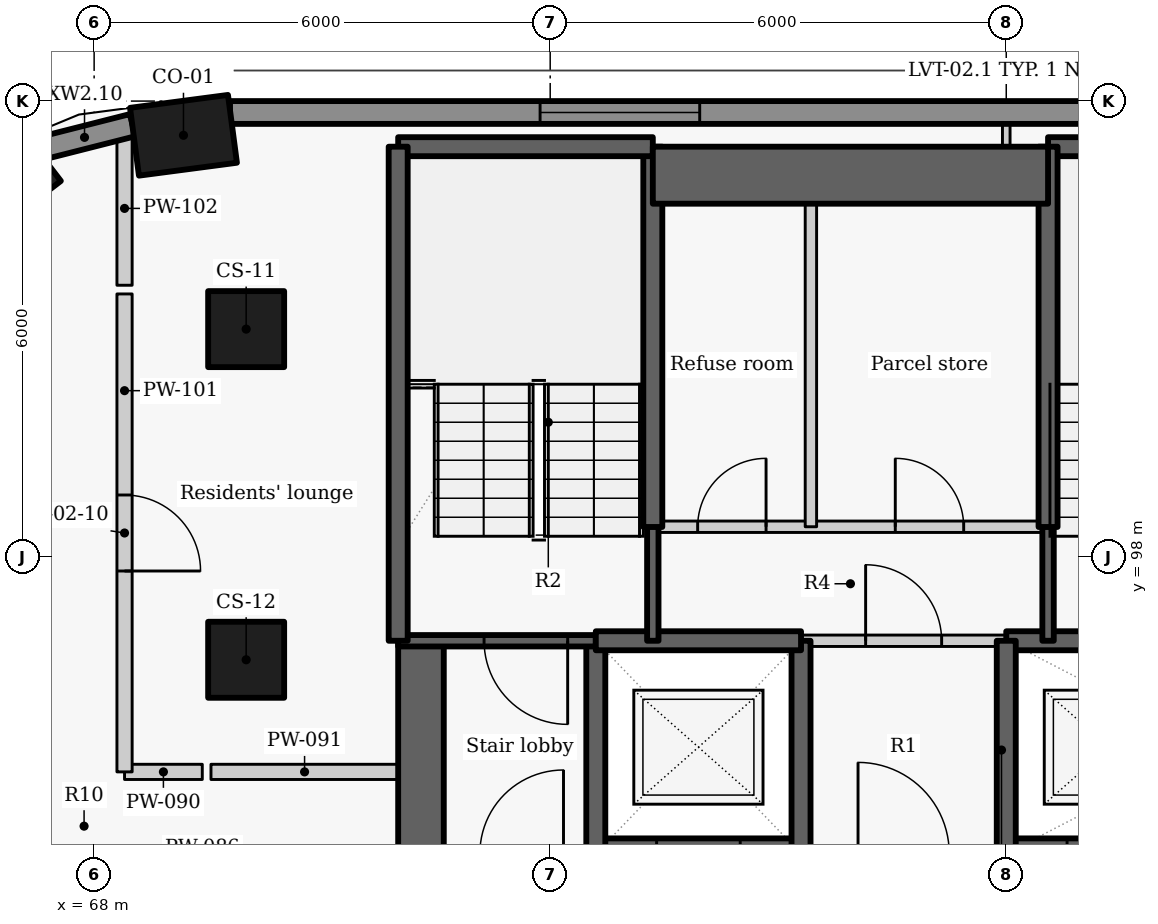
"""IFC4 building model, lengths in metres.
Left out: names, types, materials, properties, quantities, classifications, styles, units other than length and angle.
Written with IfcOpenShell. Run it as: python <this file> out.ifc"""

import sys

from ifc_helpers import new_model, si_unit, direction, frame, frame_2d, origin, origin_2d, place, context, subcontext, project, spatial, rectangle, extrude, element, fill, save


model = new_model("IFC4")
c1 = context("Model", 3, precision=1e-05, world=origin(), true_north=direction((0.0, 1.0)))
c2 = subcontext(c1, "Body", "Model", "MODEL_VIEW")
j1 = project(units=[si_unit("LENGTHUNIT", "METRE"), si_unit("PLANEANGLEUNIT", "RADIAN")], contexts=[c1])
p1 = place(None, origin())
s1 = spatial("IfcSite", under=j1, at=p1, CompositionType="ELEMENT")
p2 = place(p1, origin())
s2 = spatial("IfcBuilding", under=s1, at=p2, CompositionType="ELEMENT")
p3 = place(p2, frame((0.0, 0.0, 130.5)))
s3 = spatial("IfcBuildingStorey", under=s2, at=p3, CompositionType="ELEMENT", Elevation=130.5)
for number, where, z_axis, x_axis in (
    (1, (69.175, 103.55, 0.0), (0.0, 0.0, 1.0), (-0.991, -0.131, 0.0)),
    (2, (66.773, 102.91, 0.0), (0.0, 0.0, 1.0), (-0.793, -0.609, 0.0)),
):
    element("IfcColumn", number, at=place(p3, frame(where, z_axis=z_axis, x_axis=x_axis)), inside=s3, PredefinedType="COLUMN", context=c2, shape_type="SweptSolid", body=[
        extrude(rectangle(XDim=1.3, YDim=0.9, at=origin_2d()), origin(), (0.0, 0.0, 1.0), 3.3),
    ])
for number, where, z_axis, x_axis in (
    (3, (70.0, 101.0, 0.0), (0.0, 0.0, 1.0), (0.0, -1.0, 0.0)),
    (4, (70.0, 96.65, 0.0), (0.0, 0.0, 1.0), (0.0, -1.0, 0.0)),
):
    element("IfcColumn", number, at=place(p3, frame(where, z_axis=z_axis, x_axis=x_axis)), inside=s3, PredefinedType="COLUMN", context=c2, shape_type="SweptSolid", body=[
        extrude(rectangle(XDim=1.0, YDim=1.0, at=origin_2d()), origin(), (0.0, 0.0, 1.0), 3.3),
    ])
p4 = place(p3, frame((90.179, 103.85, 0.0), z_axis=(0.0, 0.0, 1.0), x_axis=(-1.0, 0.0, 0.0)))
e5 = element("IfcWall", 5, at=p4, inside=s3, PredefinedType="SOLIDWALL", context=c2, shape_type="SweptSolid", body=[
    extrude(rectangle(XDim=20.391, YDim=0.3, at=frame_2d((10.196, 0.0))), origin(), (0.0, 0.0, 1.0), 2.425),
])
p5 = place(p4, frame((4.051, 0.0, 0.9)))
e6 = element("IfcOpeningElement", 6, at=p5, cuts=e5, PredefinedType="OPENING", context=c2, shape_type="SweptSolid", body=[
    extrude(rectangle(XDim=2.1, YDim=1.1, at=frame_2d((1.05, 0.55))), frame((0.0, 0.16, 0.0), z_axis=(0.0, -1.0, 0.0), x_axis=(1.0, 0.0, 0.0)), (0.0, 0.0, 1.0), 0.32),
])
p6 = place(p4, frame((14.212, 0.0, 0.9)))
e7 = element("IfcOpeningElement", 7, at=p6, cuts=e5, PredefinedType="OPENING", context=c2, shape_type="SweptSolid", body=[
    extrude(rectangle(XDim=2.1, YDim=1.1, at=frame_2d((1.05, 0.55))), frame((0.0, 0.16, 0.0), z_axis=(0.0, -1.0, 0.0), x_axis=(1.0, 0.0, 0.0)), (0.0, 0.0, 1.0), 0.32),
])
p7 = place(p3, frame((68.506, 103.683, 0.0), z_axis=(0.0, 0.0, 1.0), x_axis=(-0.96924493129, -0.246098076322, 0.0)))
e8 = element("IfcWall", 8, at=p7, inside=s3, PredefinedType="SOLIDWALL", context=c2, shape_type="SweptSolid", body=[
    extrude(rectangle(XDim=1.305, YDim=0.3, at=frame_2d((0.653, 0.0))), origin(), (0.0, 0.0, 1.0), 2.425),
])
p8 = place(p3, frame((72.3, 87.8, -0.275), z_axis=(0.0, 0.0, 1.0), x_axis=(0.0, 1.0, 0.0)))
e9 = element("IfcWall", 9, at=p8, inside=s3, PredefinedType="SHEAR", context=c2, shape_type="SweptSolid", body=[
    extrude(rectangle(XDim=9.1, YDim=0.6, at=frame_2d((4.55, 0.0))), origin(), (0.0, 0.0, 1.0), 3.3),
])
p9 = place(p8, frame((3.852, 0.0, 0.275)))
e10 = element("IfcOpeningElement", 10, at=p9, cuts=e9, PredefinedType="OPENING", context=c2, shape_type="SweptSolid", body=[
    extrude(rectangle(XDim=1.5, YDim=2.1, at=frame_2d((0.75, 1.05))), frame((0.0, 0.31, 0.0), z_axis=(0.0, -1.0, 0.0), x_axis=(1.0, 0.0, 0.0)), (0.0, 0.0, 1.0), 0.62),
])
p10 = place(p3, frame((74.597, 94.1, -0.275), z_axis=(0.0, 0.0, 1.0), x_axis=(1.0, 0.0, 0.0)))
e11 = element("IfcWall", 11, at=p10, inside=s3, PredefinedType="SHEAR", context=c2, shape_type="SweptSolid", body=[
    extrude(rectangle(XDim=2.706, YDim=0.4, at=frame_2d((1.353, 0.0))), origin(), (0.0, 0.0, 1.0), 3.3),
])
p11 = place(p10, frame((0.803, 0.0, 0.275)))
e12 = element("IfcOpeningElement", 12, at=p11, cuts=e11, PredefinedType="OPENING", context=c2, shape_type="SweptSolid", body=[
    extrude(rectangle(XDim=1.1, YDim=2.1, at=frame_2d((0.55, 1.05))), frame((0.0, 0.21, 0.0), z_axis=(0.0, -1.0, 0.0), x_axis=(1.0, 0.0, 0.0)), (0.0, 0.0, 1.0), 0.42),
])
p12 = place(p3, frame((79.997, 94.1, -0.275), z_axis=(0.0, 0.0, 1.0), x_axis=(1.0, 0.0, 0.0)))
e13 = element("IfcWall", 13, at=p12, inside=s3, PredefinedType="SHEAR", context=c2, shape_type="SweptSolid", body=[
    extrude(rectangle(XDim=5.406, YDim=0.4, at=frame_2d((2.703, 0.0))), origin(), (0.0, 0.0, 1.0), 3.3),
])
p13 = place(p12, frame((0.803, 0.0, 0.275)))
e14 = element("IfcOpeningElement", 14, at=p13, cuts=e13, PredefinedType="OPENING", context=c2, shape_type="SweptSolid", body=[
    extrude(rectangle(XDim=1.1, YDim=2.1, at=frame_2d((0.55, 1.05))), frame((0.0, 0.21, 0.0), z_axis=(0.0, -1.0, 0.0), x_axis=(1.0, 0.0, 0.0)), (0.0, 0.0, 1.0), 0.42),
])
p14 = place(p3, frame((74.6, 94.1, -0.275), z_axis=(0.0, 0.0, 1.0), x_axis=(0.0, 1.0, 0.0)))
e15 = element("IfcWall", 15, at=p14, inside=s3, PredefinedType="SHEAR", context=c2, shape_type="SweptSolid", body=[
    extrude(rectangle(XDim=2.8, YDim=0.25, at=frame_2d((1.4, 0.0))), origin(), (0.0, 0.0, 1.0), 3.3),
])
p15 = place(p3, frame((74.6, 96.9, -0.275), z_axis=(0.0, 0.0, 1.0), x_axis=(-1.0, 0.0, 0.0)))
e16 = element("IfcWall", 16, at=p15, inside=s3, PredefinedType="SHEAR", context=c2, shape_type="SweptSolid", body=[
    extrude(rectangle(XDim=2.6, YDim=0.15, at=frame_2d((1.3, 0.0))), origin(), (0.0, 0.0, 1.0), 3.3),
])
p16 = place(p15, frame((0.37, 0.0, 0.275)))
e17 = element("IfcOpeningElement", 17, at=p16, cuts=e16, PredefinedType="OPENING", context=c2, shape_type="SweptSolid", body=[
    extrude(rectangle(XDim=1.1, YDim=2.1, at=frame_2d((0.55, 1.05))), frame((0.0, 0.085, 0.0), z_axis=(0.0, -1.0, 0.0), x_axis=(1.0, 0.0, 0.0)), (0.0, 0.0, 1.0), 0.17),
])
p17 = place(p3, frame((77.3, 94.1, -0.275), z_axis=(0.0, 0.0, 1.0), x_axis=(0.0, 1.0, 0.0)))
e18 = element("IfcWall", 18, at=p17, inside=s3, PredefinedType="SHEAR", context=c2, shape_type="SweptSolid", body=[
    extrude(rectangle(XDim=2.8, YDim=0.25, at=frame_2d((1.4, 0.0))), origin(), (0.0, 0.0, 1.0), 3.3),
])
p18 = place(p3, frame((74.6, 96.9, -0.275), z_axis=(0.0, 0.0, 1.0), x_axis=(1.0, 0.0, 0.0)))
e19 = element("IfcWall", 19, at=p18, inside=s3, PredefinedType="SHEAR", context=c2, shape_type="SweptSolid", body=[
    extrude(rectangle(XDim=2.7, YDim=0.25, at=frame_2d((1.35, 0.0))), origin(), (0.0, 0.0, 1.0), 3.3),
])
p19 = place(p3, frame((80.0, 96.9, -0.275), z_axis=(0.0, 0.0, 1.0), x_axis=(1.0, 0.0, 0.0)))
e20 = element("IfcWall", 20, at=p19, inside=s3, PredefinedType="SHEAR", context=c2, shape_type="SweptSolid", body=[
    extrude(rectangle(XDim=8.0, YDim=0.25, at=frame_2d((4.0, 0.0))), origin(), (0.0, 0.0, 1.0), 3.3),
])
p20 = place(p19, frame((3.849, 0.0, 0.275)))
e21 = element("IfcOpeningElement", 21, at=p20, cuts=e20, PredefinedType="OPENING", context=c2, shape_type="SweptSolid", body=[
    extrude(rectangle(XDim=1.1, YDim=2.1, at=frame_2d((0.55, 1.05))), frame((0.0, 0.135, 0.0), z_axis=(0.0, -1.0, 0.0), x_axis=(1.0, 0.0, 0.0)), (0.0, 0.0, 1.0), 0.27),
])
p21 = place(p3, frame((80.0, 94.1, -0.275), z_axis=(0.0, 0.0, 1.0), x_axis=(0.0, 1.0, 0.0)))
e22 = element("IfcWall", 22, at=p21, inside=s3, PredefinedType="SHEAR", context=c2, shape_type="SweptSolid", body=[
    extrude(rectangle(XDim=2.8, YDim=0.25, at=frame_2d((1.4, 0.0))), origin(), (0.0, 0.0, 1.0), 3.3),
])
p22 = place(p3, frame((77.3, 96.9, 0.0), z_axis=(0.0, 0.0, 1.0), x_axis=(1.0, 0.0, 0.0)))
e23 = element("IfcWall", 23, at=p22, inside=s3, PredefinedType="PARTITIONING", context=c2, shape_type="SweptSolid", body=[
    extrude(rectangle(XDim=2.7, YDim=0.15, at=frame_2d((1.35, 0.0))), origin(), (0.0, 0.0, 1.0), 3.025),
])
p23 = place(p22, frame((0.85, 0.0, 0.0)))
e24 = element("IfcOpeningElement", 24, at=p23, cuts=e23, PredefinedType="OPENING", context=c2, shape_type="SweptSolid", body=[
    extrude(rectangle(XDim=1.0, YDim=2.1, at=frame_2d((0.5, 1.05))), frame((0.0, 0.085, 0.0), z_axis=(0.0, -1.0, 0.0), x_axis=(1.0, 0.0, 0.0)), (0.0, 0.0, 1.0), 0.17),
])
p24 = place(p3, frame((75.35, 96.9, -0.275), z_axis=(0.0, 0.0, 1.0), x_axis=(0.0, 1.0, 0.0)))
e25 = element("IfcWall", 25, at=p24, inside=s3, PredefinedType="SHEAR", context=c2, shape_type="SweptSolid", body=[
    extrude(rectangle(XDim=1.503, YDim=0.15, at=frame_2d((0.751, 0.0))), origin(), (0.0, 0.0, 1.0), 3.3),
])
p25 = place(p3, frame((75.35, 98.397, -0.275), z_axis=(0.0, 0.0, 1.0), x_axis=(0.0, 1.0, 0.0)))
e26 = element("IfcWall", 26, at=p25, inside=s3, PredefinedType="SHEAR", context=c2, shape_type="SweptSolid", body=[
    extrude(rectangle(XDim=5.003, YDim=0.25, at=frame_2d((2.501, 0.0))), origin(), (0.0, 0.0, 1.0), 3.3),
])
p26 = place(p3, frame((72.0, 103.4, -0.275), z_axis=(0.0, 0.0, 1.0), x_axis=(1.0, 0.0, 0.0)))
e27 = element("IfcWall", 27, at=p26, inside=s3, PredefinedType="SHEAR", context=c2, shape_type="SweptSolid", body=[
    extrude(rectangle(XDim=3.35, YDim=0.25, at=frame_2d((1.675, 0.0))), origin(), (0.0, 0.0, 1.0), 3.3),
])
p27 = place(p3, frame((80.55, 103.4, -0.275), z_axis=(0.0, 0.0, 1.0), x_axis=(1.0, 0.0, 0.0)))
e28 = element("IfcWall", 28, at=p27, inside=s3, PredefinedType="SHEAR", context=c2, shape_type="SweptSolid", body=[
    extrude(rectangle(XDim=2.85, YDim=0.25, at=frame_2d((1.425, 0.0))), origin(), (0.0, 0.0, 1.0), 3.3),
])
p28 = place(p3, frame((72.0, 96.9, -0.275), z_axis=(0.0, 0.0, 1.0), x_axis=(0.0, 1.0, 0.0)))
e29 = element("IfcWall", 29, at=p28, inside=s3, PredefinedType="SHEAR", context=c2, shape_type="SweptSolid", body=[
    extrude(rectangle(XDim=6.5, YDim=0.25, at=frame_2d((3.25, 0.0))), origin(), (0.0, 0.0, 1.0), 3.3),
])
p29 = place(p3, frame((80.55, 96.9, -0.275), z_axis=(0.0, 0.0, 1.0), x_axis=(0.0, 1.0, 0.0)))
e30 = element("IfcWall", 30, at=p29, inside=s3, PredefinedType="SHEAR", context=c2, shape_type="SweptSolid", body=[
    extrude(rectangle(XDim=1.503, YDim=0.15, at=frame_2d((0.751, 0.0))), origin(), (0.0, 0.0, 1.0), 3.3),
])
p30 = place(p3, frame((80.55, 98.397, -0.275), z_axis=(0.0, 0.0, 1.0), x_axis=(0.0, 1.0, 0.0)))
e31 = element("IfcWall", 31, at=p30, inside=s3, PredefinedType="SHEAR", context=c2, shape_type="SweptSolid", body=[
    extrude(rectangle(XDim=5.003, YDim=0.25, at=frame_2d((2.501, 0.0))), origin(), (0.0, 0.0, 1.0), 3.3),
])
p31 = place(p3, frame((75.35, 103.025, -0.275), z_axis=(0.0, 0.0, 1.0), x_axis=(1.0, 0.0, 0.0)))
e32 = element("IfcWall", 32, at=p31, inside=s3, PredefinedType="SHEAR", context=c2, shape_type="SweptSolid", body=[
    extrude(rectangle(XDim=5.2, YDim=0.75, at=frame_2d((2.6, 0.0))), origin(), (0.0, 0.0, 1.0), 3.3),
])
p32 = place(p3, frame((75.35, 98.4, 0.0), z_axis=(0.0, 0.0, 1.0), x_axis=(1.0, 0.0, 0.0)))
e33 = element("IfcWall", 33, at=p32, inside=s3, PredefinedType="PARTITIONING", context=c2, shape_type="SweptSolid", body=[
    extrude(rectangle(XDim=5.2, YDim=0.15, at=frame_2d((2.6, 0.0))), origin(), (0.0, 0.0, 1.0), 3.025),
])
p33 = place(p32, frame((0.59, 0.0, 0.0)))
e34 = element("IfcOpeningElement", 34, at=p33, cuts=e33, PredefinedType="OPENING", context=c2, shape_type="SweptSolid", body=[
    extrude(rectangle(XDim=0.9, YDim=2.1, at=frame_2d((0.45, 1.05))), frame((0.0, 0.085, 0.0), z_axis=(0.0, -1.0, 0.0), x_axis=(1.0, 0.0, 0.0)), (0.0, 0.0, 1.0), 0.17),
])
p34 = place(p32, frame((3.19, 0.0, 0.0)))
e35 = element("IfcOpeningElement", 35, at=p34, cuts=e33, PredefinedType="OPENING", context=c2, shape_type="SweptSolid", body=[
    extrude(rectangle(XDim=0.9, YDim=2.1, at=frame_2d((0.45, 1.05))), frame((0.0, 0.085, 0.0), z_axis=(0.0, -1.0, 0.0), x_axis=(1.0, 0.0, 0.0)), (0.0, 0.0, 1.0), 0.17),
])
p35 = place(p3, frame((77.43, 98.4, 0.0), z_axis=(0.0, 0.0, 1.0), x_axis=(0.0, 1.0, 0.0)))
e36 = element("IfcWall", 36, at=p35, inside=s3, PredefinedType="PARTITIONING", context=c2, shape_type="SweptSolid", body=[
    extrude(rectangle(XDim=5.0, YDim=0.15, at=frame_2d((2.5, 0.0))), origin(), (0.0, 0.0, 1.0), 3.025),
])
p36 = place(p3, frame((68.4, 95.175, 0.0), z_axis=(0.0, 0.0, 1.0), x_axis=(1.0, 0.0, 0.0)))
e37 = element("IfcWall", 37, at=p36, inside=s3, PredefinedType="PARTITIONING", context=c2, shape_type="SweptSolid", body=[
    extrude(rectangle(XDim=1.023, YDim=0.2, at=frame_2d((0.511, 0.0))), origin(), (0.0, 0.0, 1.0), 3.025),
])
p37 = place(p3, frame((69.537, 95.175, 0.0), z_axis=(0.0, 0.0, 1.0), x_axis=(1.0, 0.0, 0.0)))
e38 = element("IfcWall", 38, at=p37, inside=s3, PredefinedType="PARTITIONING", context=c2, shape_type="SweptSolid", body=[
    extrude(rectangle(XDim=2.463, YDim=0.2, at=frame_2d((1.231, 0.0))), origin(), (0.0, 0.0, 1.0), 2.505),
])
p38 = place(p3, frame((68.4, 101.463, 0.0), z_axis=(0.0, 0.0, 1.0), x_axis=(0.0, -1.0, 0.0)))
e39 = element("IfcWall", 39, at=p38, inside=s3, PredefinedType="PARTITIONING", context=c2, shape_type="SweptSolid", body=[
    extrude(rectangle(XDim=6.288, YDim=0.2, at=frame_2d((3.144, 0.0))), origin(), (0.0, 0.0, 1.0), 3.025),
])
p39 = place(p38, frame((2.645, 0.0, 0.0)))
e40 = element("IfcOpeningElement", 40, at=p39, cuts=e39, PredefinedType="OPENING", context=c2, shape_type="SweptSolid", body=[
    extrude(rectangle(XDim=1.0, YDim=2.1, at=frame_2d((0.5, 1.05))), frame((0.0, 0.11, 0.0), z_axis=(0.0, -1.0, 0.0), x_axis=(1.0, 0.0, 0.0)), (0.0, 0.0, 1.0), 0.22),
])
p40 = place(p3, frame((68.4, 101.577, 0.0), z_axis=(0.0, 0.0, 1.0), x_axis=(0.0, 1.0, 0.0)))
e41 = element("IfcWall", 41, at=p40, inside=s3, PredefinedType="PARTITIONING", context=c2, shape_type="SweptSolid", body=[
    extrude(rectangle(XDim=2.022, YDim=0.2, at=frame_2d((1.011, 0.0))), origin(), (0.0, 0.0, 1.0), 2.405),
])
p41 = place(p3, frame((80.0, 103.4, 0.0), z_axis=(0.0, 0.0, 1.0), x_axis=(0.0, 1.0, 0.0)))
e42 = element("IfcWall", 42, at=p41, inside=s3, PredefinedType="PARTITIONING", context=c2, shape_type="SweptSolid", body=[
    extrude(rectangle(XDim=0.3, YDim=0.1, at=frame_2d((0.15, 0.0))), origin(), (0.0, 0.0, 1.0), 3.025),
])
p42 = place(p6, origin())
e43 = element("IfcWindow", 43, at=p42, inside=s3, PartitioningType="SINGLE_PANEL", PredefinedType="WINDOW", context=c2, shape_type="SweptSolid", body=[
    extrude(rectangle(XDim=2.1, YDim=1.1, at=frame_2d((1.05, 0.55))), frame((0.0, 0.03, 0.0), z_axis=(0.0, -1.0, 0.0), x_axis=(1.0, 0.0, 0.0)), (0.0, 0.0, 1.0), 0.06),
])
fill(e7, e43)
p43 = place(p23, origin())
e44 = element("IfcDoor", 44, at=p43, inside=s3, OperationType="SINGLE_SWING_LEFT", PredefinedType="DOOR", context=c2, shape_type="SweptSolid", body=[
    extrude(rectangle(XDim=1.0, YDim=2.1, at=frame_2d((0.5, 1.05))), frame((0.0, 0.025, 0.0), z_axis=(0.0, -1.0, 0.0), x_axis=(1.0, 0.0, 0.0)), (0.0, 0.0, 1.0), 0.05),
])
fill(e24, e44)
p44 = place(p33, origin())
e45 = element("IfcDoor", 45, at=p44, inside=s3, OperationType="SINGLE_SWING_RIGHT", PredefinedType="DOOR", context=c2, shape_type="SweptSolid", body=[
    extrude(rectangle(XDim=0.9, YDim=2.1, at=frame_2d((0.45, 1.05))), frame((0.0, 0.025, 0.0), z_axis=(0.0, -1.0, 0.0), x_axis=(1.0, 0.0, 0.0)), (0.0, 0.0, 1.0), 0.05),
])
fill(e34, e45)
p45 = place(p34, origin())
e46 = element("IfcDoor", 46, at=p45, inside=s3, OperationType="SINGLE_SWING_LEFT", PredefinedType="DOOR", context=c2, shape_type="SweptSolid", body=[
    extrude(rectangle(XDim=0.9, YDim=2.1, at=frame_2d((0.45, 1.05))), frame((0.0, 0.025, 0.0), z_axis=(0.0, -1.0, 0.0), x_axis=(1.0, 0.0, 0.0)), (0.0, 0.0, 1.0), 0.05),
])
fill(e35, e46)
p46 = place(p16, origin())
e47 = element("IfcDoor", 47, at=p46, inside=s3, OperationType="SINGLE_SWING_LEFT", PredefinedType="DOOR", context=c2, shape_type="SweptSolid", body=[
    extrude(rectangle(XDim=1.1, YDim=2.1, at=frame_2d((0.55, 1.05))), frame((0.0, 0.025, 0.0), z_axis=(0.0, -1.0, 0.0), x_axis=(1.0, 0.0, 0.0)), (0.0, 0.0, 1.0), 0.05),
])
fill(e17, e47)
p47 = place(p39, origin())
e48 = element("IfcDoor", 48, at=p47, inside=s3, OperationType="SINGLE_SWING_RIGHT", PredefinedType="DOOR", context=c2, shape_type="SweptSolid", body=[
    extrude(rectangle(XDim=1.0, YDim=2.1, at=frame_2d((0.5, 1.05))), frame((0.0, 0.025, 0.0), z_axis=(0.0, -1.0, 0.0), x_axis=(1.0, 0.0, 0.0)), (0.0, 0.0, 1.0), 0.05),
])
fill(e40, e48)
save(model, sys.argv[1])
